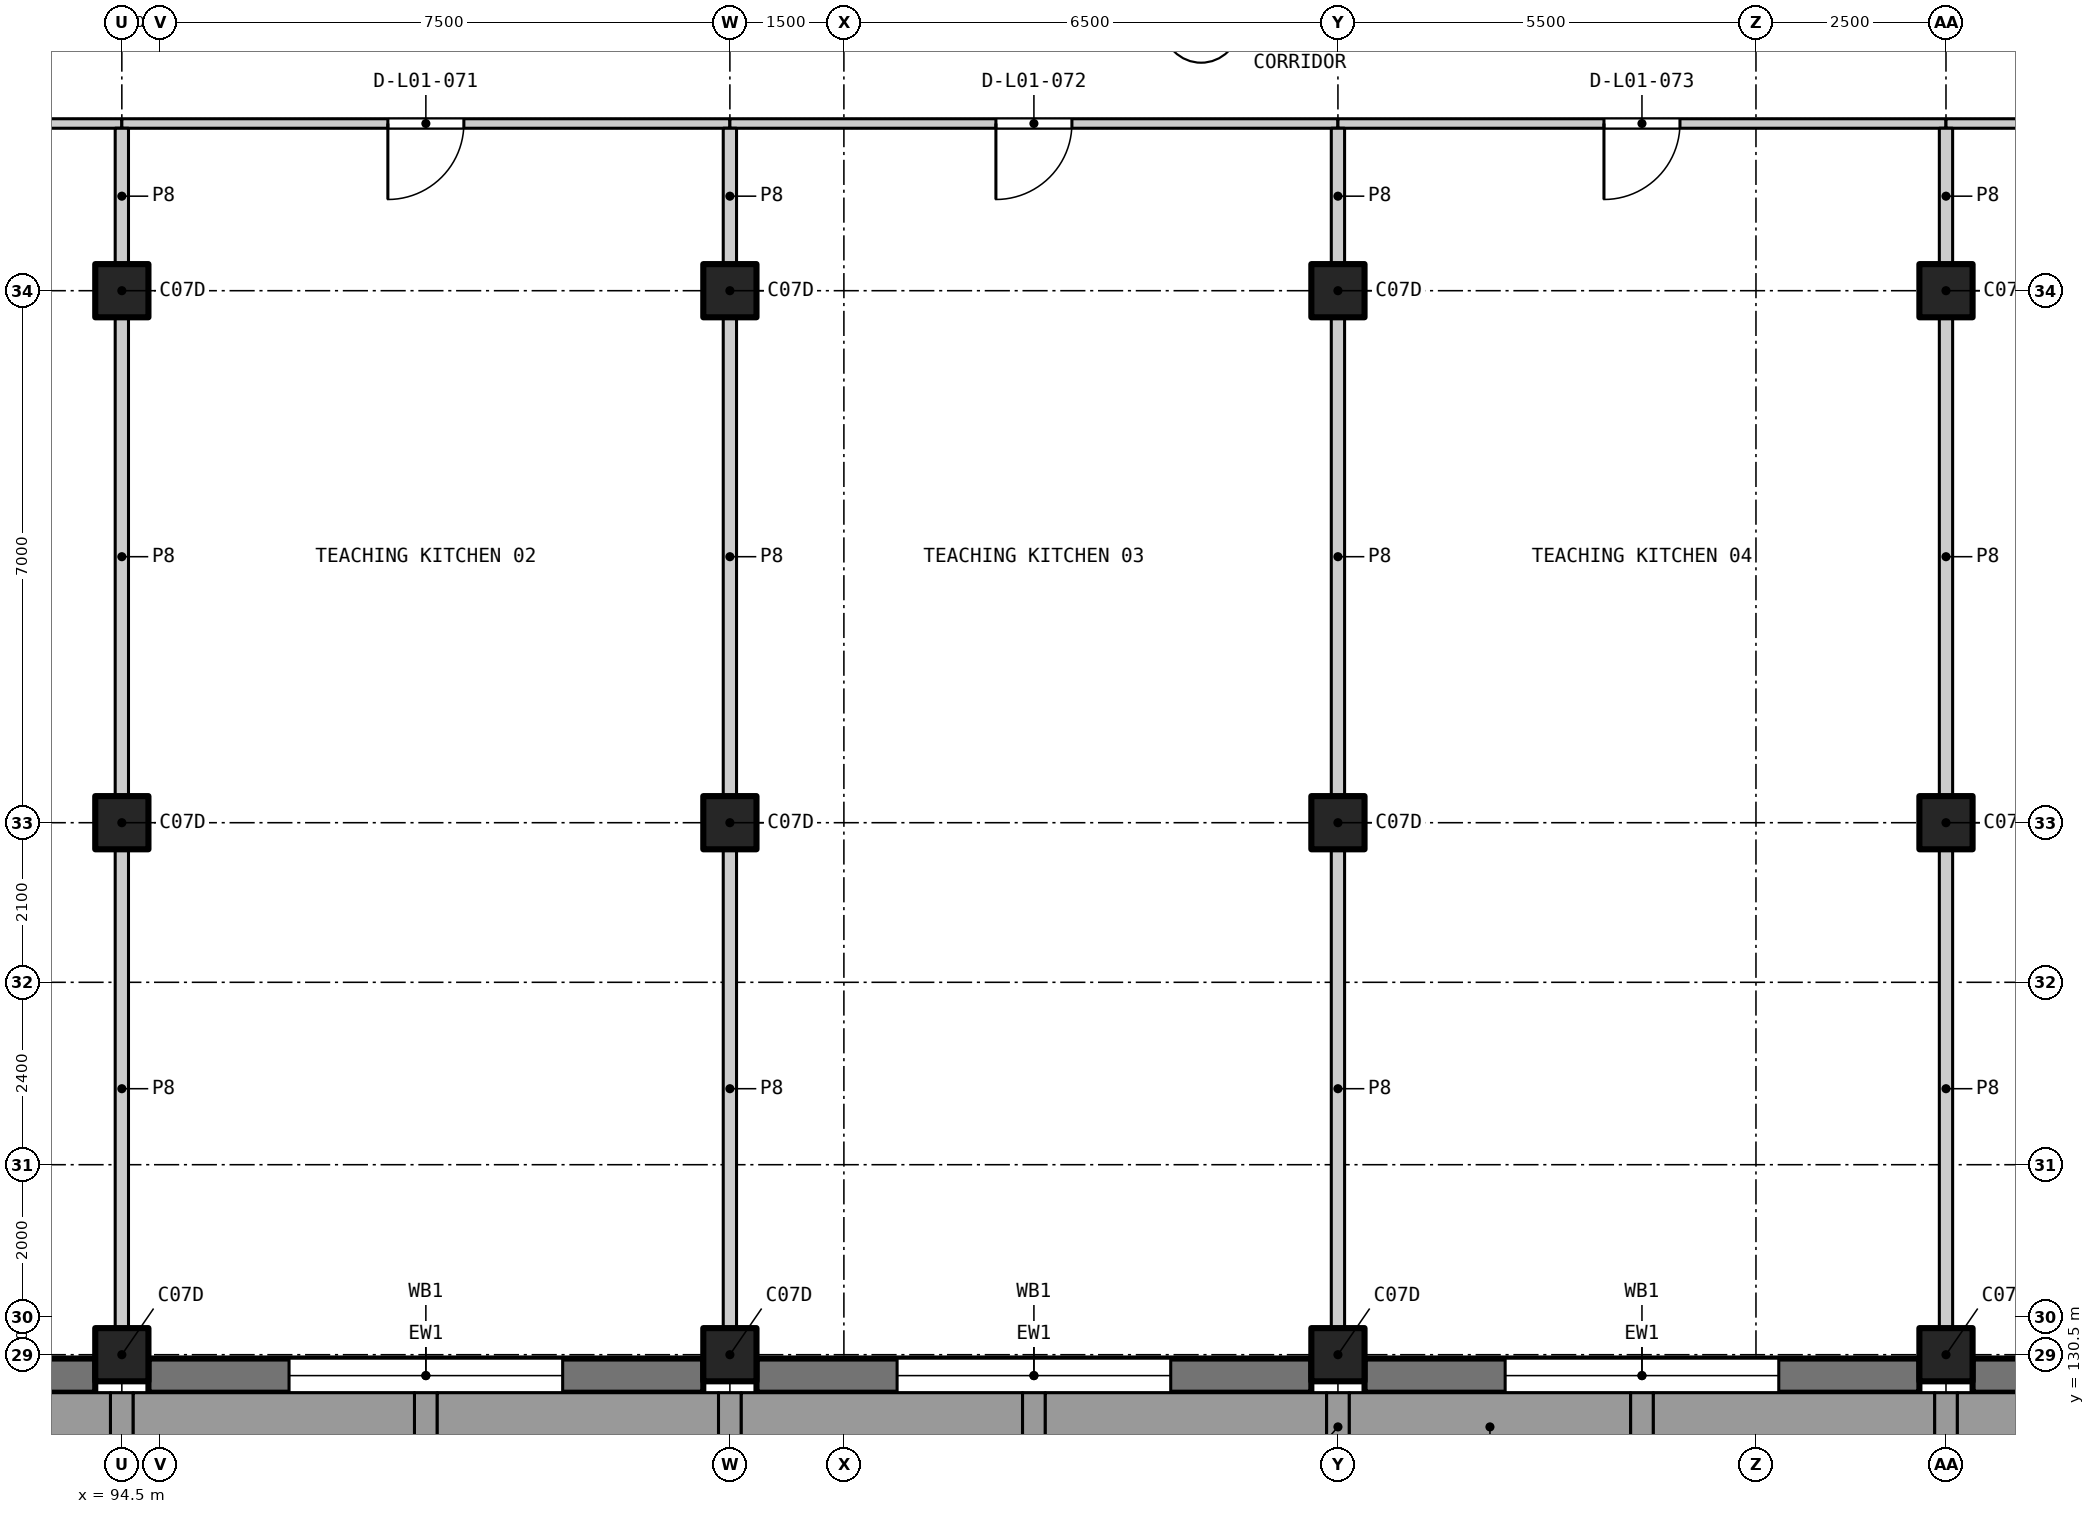
"""IFC4 building model, lengths in metres.
Left out: names, types, materials, properties, quantities, classifications, styles, units other than length and angle.
Written with IfcOpenShell. Run it as: python <this file> out.ifc"""

import sys

from ifc_helpers import new_model, si_unit, direction, frame, frame_2d, origin, origin_2d, place, context, subcontext, project, spatial, rectangle, extrude, element, fill, save


model = new_model("IFC4")
c1 = context("Model", 3, precision=1e-05, world=origin(), true_north=direction((0.0, 1.0)))
c2 = subcontext(c1, "Body", "Model", "MODEL_VIEW")
j1 = project(units=[si_unit("LENGTHUNIT", "METRE"), si_unit("PLANEANGLEUNIT", "RADIAN")], contexts=[c1])
p1 = place(None, origin())
s1 = spatial("IfcSite", under=j1, at=p1, CompositionType="ELEMENT")
p2 = place(p1, origin())
s2 = spatial("IfcBuilding", under=s1, at=p2, CompositionType="ELEMENT")
p3 = place(p2, frame((0.0, 0.0, 6.0)))
s3 = spatial("IfcBuildingStorey", under=s2, at=p3, CompositionType="ELEMENT", Elevation=6.0)
for number, where, z_axis, x_axis in (
    (1, (94.5, 130.5, 0.0), (0.0, 0.0, 1.0), (1.0, 0.0, 0.0)),
    (2, (94.5, 137.5, 0.0), (0.0, 0.0, 1.0), (1.0, 0.0, 0.0)),
    (3, (94.5, 144.5, 0.0), (0.0, 0.0, 1.0), (1.0, 0.0, 0.0)),
    (4, (102.5, 130.5, 0.0), (0.0, 0.0, 1.0), (1.0, 0.0, 0.0)),
    (5, (102.5, 137.5, 0.0), (0.0, 0.0, 1.0), (1.0, 0.0, 0.0)),
    (6, (102.5, 144.5, 0.0), (0.0, 0.0, 1.0), (1.0, 0.0, 0.0)),
    (7, (110.5, 130.5, 0.0), (0.0, 0.0, 1.0), (1.0, 0.0, 0.0)),
    (8, (110.5, 137.5, 0.0), (0.0, 0.0, 1.0), (1.0, 0.0, 0.0)),
    (9, (110.5, 144.5, 0.0), (0.0, 0.0, 1.0), (1.0, 0.0, 0.0)),
    (10, (118.5, 130.5, 0.0), (0.0, 0.0, 1.0), (1.0, 0.0, 0.0)),
    (11, (118.5, 137.5, 0.0), (0.0, 0.0, 1.0), (1.0, 0.0, 0.0)),
    (12, (118.5, 144.5, 0.0), (0.0, 0.0, 1.0), (1.0, 0.0, 0.0)),
):
    element("IfcColumn", number, at=place(p3, frame(where, z_axis=z_axis, x_axis=x_axis)), inside=s3, PredefinedType="COLUMN", context=c2, shape_type="SweptSolid", body=[
        extrude(rectangle(XDim=0.7, YDim=0.7, at=origin_2d()), origin(), (0.0, 0.0, 1.0), 4.2),
    ])
p4 = place(p3, frame((94.15, 130.225, 0.0), z_axis=(0.0, 0.0, 1.0), x_axis=(-1.0, 0.0, 0.0)))
e13 = element("IfcWall", 13, at=p4, inside=s3, PredefinedType="SOLIDWALL", context=c2, shape_type="SweptSolid", body=[
    extrude(rectangle(XDim=7.3, YDim=0.45, at=frame_2d((3.65, 0.0))), origin(), (0.0, 0.0, 1.0), 3.1),
])
p5 = place(p4, frame((1.85, 0.0, 0.9)))
e14 = element("IfcOpeningElement", 14, at=p5, cuts=e13, PredefinedType="OPENING", context=c2, shape_type="SweptSolid", body=[
    extrude(rectangle(XDim=3.6, YDim=1.6, at=frame_2d((1.8, 0.8))), frame((0.0, 0.235, 0.0), z_axis=(0.0, -1.0, 0.0), x_axis=(1.0, 0.0, 0.0)), (0.0, 0.0, 1.0), 0.47),
])
p6 = place(p3, frame((102.15, 130.225, 0.0), z_axis=(0.0, 0.0, 1.0), x_axis=(-1.0, 0.0, 0.0)))
e15 = element("IfcWall", 15, at=p6, inside=s3, PredefinedType="SOLIDWALL", context=c2, shape_type="SweptSolid", body=[
    extrude(rectangle(XDim=7.3, YDim=0.45, at=frame_2d((3.65, 0.0))), origin(), (0.0, 0.0, 1.0), 3.1),
])
p7 = place(p6, frame((1.85, 0.0, 0.9)))
e16 = element("IfcOpeningElement", 16, at=p7, cuts=e15, PredefinedType="OPENING", context=c2, shape_type="SweptSolid", body=[
    extrude(rectangle(XDim=3.6, YDim=1.6, at=frame_2d((1.8, 0.8))), frame((0.0, 0.235, 0.0), z_axis=(0.0, -1.0, 0.0), x_axis=(1.0, 0.0, 0.0)), (0.0, 0.0, 1.0), 0.47),
])
p8 = place(p3, frame((110.15, 130.225, 0.0), z_axis=(0.0, 0.0, 1.0), x_axis=(-1.0, 0.0, 0.0)))
e17 = element("IfcWall", 17, at=p8, inside=s3, PredefinedType="SOLIDWALL", context=c2, shape_type="SweptSolid", body=[
    extrude(rectangle(XDim=7.3, YDim=0.45, at=frame_2d((3.65, 0.0))), origin(), (0.0, 0.0, 1.0), 3.1),
])
p9 = place(p8, frame((1.85, 0.0, 0.9)))
e18 = element("IfcOpeningElement", 18, at=p9, cuts=e17, PredefinedType="OPENING", context=c2, shape_type="SweptSolid", body=[
    extrude(rectangle(XDim=3.6, YDim=1.6, at=frame_2d((1.8, 0.8))), frame((0.0, 0.235, 0.0), z_axis=(0.0, -1.0, 0.0), x_axis=(1.0, 0.0, 0.0)), (0.0, 0.0, 1.0), 0.47),
])
p10 = place(p3, frame((118.15, 130.225, 0.0), z_axis=(0.0, 0.0, 1.0), x_axis=(-1.0, 0.0, 0.0)))
e19 = element("IfcWall", 19, at=p10, inside=s3, PredefinedType="SOLIDWALL", context=c2, shape_type="SweptSolid", body=[
    extrude(rectangle(XDim=7.3, YDim=0.45, at=frame_2d((3.65, 0.0))), origin(), (0.0, 0.0, 1.0), 3.1),
])
p11 = place(p10, frame((1.85, 0.0, 0.9)))
e20 = element("IfcOpeningElement", 20, at=p11, cuts=e19, PredefinedType="OPENING", context=c2, shape_type="SweptSolid", body=[
    extrude(rectangle(XDim=3.6, YDim=1.6, at=frame_2d((1.8, 0.8))), frame((0.0, 0.235, 0.0), z_axis=(0.0, -1.0, 0.0), x_axis=(1.0, 0.0, 0.0)), (0.0, 0.0, 1.0), 0.47),
])
p12 = place(p3, frame((126.15, 130.225, 0.0), z_axis=(0.0, 0.0, 1.0), x_axis=(-1.0, 0.0, 0.0)))
e21 = element("IfcWall", 21, at=p12, inside=s3, PredefinedType="SOLIDWALL", context=c2, shape_type="SweptSolid", body=[
    extrude(rectangle(XDim=7.3, YDim=0.45, at=frame_2d((3.65, 0.0))), origin(), (0.0, 0.0, 1.0), 3.1),
])
p13 = place(p12, frame((1.85, 0.0, 0.9)))
e22 = element("IfcOpeningElement", 22, at=p13, cuts=e21, PredefinedType="OPENING", context=c2, shape_type="SweptSolid", body=[
    extrude(rectangle(XDim=3.6, YDim=1.6, at=frame_2d((1.8, 0.8))), frame((0.0, 0.235, 0.0), z_axis=(0.0, -1.0, 0.0), x_axis=(1.0, 0.0, 0.0)), (0.0, 0.0, 1.0), 0.47),
])
p14 = place(p3, frame((86.45, 146.7, 0.0), z_axis=(0.0, 0.0, 1.0), x_axis=(1.0, 0.0, 0.0)))
e23 = element("IfcWall", 23, at=p14, inside=s3, PredefinedType="PARTITIONING", context=c2, shape_type="SweptSolid", body=[
    extrude(rectangle(XDim=8.05, YDim=0.125, at=frame_2d((4.025, 0.0))), origin(), (0.0, 0.0, 1.0), 3.9),
])
p15 = place(p14, frame((3.55, 0.0, 0.0)))
e24 = element("IfcOpeningElement", 24, at=p15, cuts=e23, PredefinedType="OPENING", context=c2, shape_type="SweptSolid", body=[
    extrude(rectangle(XDim=1.0, YDim=2.1, at=frame_2d((0.5, 1.05))), frame((0.0, 0.073, 0.0), z_axis=(0.0, -1.0, 0.0), x_axis=(1.0, 0.0, 0.0)), (0.0, 0.0, 1.0), 0.145),
])
p16 = place(p3, frame((94.5, 146.7, 0.0), z_axis=(0.0, 0.0, 1.0), x_axis=(1.0, 0.0, 0.0)))
e25 = element("IfcWall", 25, at=p16, inside=s3, PredefinedType="PARTITIONING", context=c2, shape_type="SweptSolid", body=[
    extrude(rectangle(XDim=8.0, YDim=0.125, at=frame_2d((4.0, 0.0))), origin(), (0.0, 0.0, 1.0), 3.9),
])
p17 = place(p16, frame((3.5, 0.0, 0.0)))
e26 = element("IfcOpeningElement", 26, at=p17, cuts=e25, PredefinedType="OPENING", context=c2, shape_type="SweptSolid", body=[
    extrude(rectangle(XDim=1.0, YDim=2.1, at=frame_2d((0.5, 1.05))), frame((0.0, 0.073, 0.0), z_axis=(0.0, -1.0, 0.0), x_axis=(1.0, 0.0, 0.0)), (0.0, 0.0, 1.0), 0.145),
])
p18 = place(p3, frame((102.5, 146.7, 0.0), z_axis=(0.0, 0.0, 1.0), x_axis=(1.0, 0.0, 0.0)))
e27 = element("IfcWall", 27, at=p18, inside=s3, PredefinedType="PARTITIONING", context=c2, shape_type="SweptSolid", body=[
    extrude(rectangle(XDim=8.0, YDim=0.125, at=frame_2d((4.0, 0.0))), origin(), (0.0, 0.0, 1.0), 3.9),
])
p19 = place(p18, frame((3.5, 0.0, 0.0)))
e28 = element("IfcOpeningElement", 28, at=p19, cuts=e27, PredefinedType="OPENING", context=c2, shape_type="SweptSolid", body=[
    extrude(rectangle(XDim=1.0, YDim=2.1, at=frame_2d((0.5, 1.05))), frame((0.0, 0.073, 0.0), z_axis=(0.0, -1.0, 0.0), x_axis=(1.0, 0.0, 0.0)), (0.0, 0.0, 1.0), 0.145),
])
p20 = place(p3, frame((110.5, 146.7, 0.0), z_axis=(0.0, 0.0, 1.0), x_axis=(1.0, 0.0, 0.0)))
e29 = element("IfcWall", 29, at=p20, inside=s3, PredefinedType="PARTITIONING", context=c2, shape_type="SweptSolid", body=[
    extrude(rectangle(XDim=8.0, YDim=0.125, at=frame_2d((4.0, 0.0))), origin(), (0.0, 0.0, 1.0), 3.9),
])
p21 = place(p20, frame((3.5, 0.0, 0.0)))
e30 = element("IfcOpeningElement", 30, at=p21, cuts=e29, PredefinedType="OPENING", context=c2, shape_type="SweptSolid", body=[
    extrude(rectangle(XDim=1.0, YDim=2.1, at=frame_2d((0.5, 1.05))), frame((0.0, 0.073, 0.0), z_axis=(0.0, -1.0, 0.0), x_axis=(1.0, 0.0, 0.0)), (0.0, 0.0, 1.0), 0.145),
])
p22 = place(p3, frame((118.5, 146.7, 0.0), z_axis=(0.0, 0.0, 1.0), x_axis=(1.0, 0.0, 0.0)))
e31 = element("IfcWall", 31, at=p22, inside=s3, PredefinedType="PARTITIONING", context=c2, shape_type="SweptSolid", body=[
    extrude(rectangle(XDim=8.0, YDim=0.125, at=frame_2d((4.0, 0.0))), origin(), (0.0, 0.0, 1.0), 3.9),
])
p23 = place(p22, frame((3.5, 0.0, 0.0)))
e32 = element("IfcOpeningElement", 32, at=p23, cuts=e31, PredefinedType="OPENING", context=c2, shape_type="SweptSolid", body=[
    extrude(rectangle(XDim=1.0, YDim=2.1, at=frame_2d((0.5, 1.05))), frame((0.0, 0.073, 0.0), z_axis=(0.0, -1.0, 0.0), x_axis=(1.0, 0.0, 0.0)), (0.0, 0.0, 1.0), 0.145),
])
for number, where, z_axis, x_axis in (
    (33, (94.5, 130.85, 0.0), (0.0, 0.0, 1.0), (0.0, 1.0, 0.0)),
    (34, (94.5, 137.85, 0.0), (0.0, 0.0, 1.0), (0.0, 1.0, 0.0)),
):
    element("IfcWall", number, at=place(p3, frame(where, z_axis=z_axis, x_axis=x_axis)), inside=s3, PredefinedType="PARTITIONING", context=c2, shape_type="SweptSolid", body=[
        extrude(rectangle(XDim=6.3, YDim=0.175, at=frame_2d((3.15, 0.0))), origin(), (0.0, 0.0, 1.0), 3.2),
    ])
p24 = place(p3, frame((94.5, 144.85, 0.0), z_axis=(0.0, 0.0, 1.0), x_axis=(0.0, 1.0, 0.0)))
e35 = element("IfcWall", 35, at=p24, inside=s3, PredefinedType="PARTITIONING", context=c2, shape_type="SweptSolid", body=[
    extrude(rectangle(XDim=1.787, YDim=0.175, at=frame_2d((0.894, 0.0))), origin(), (0.0, 0.0, 1.0), 3.2),
])
for number, where, z_axis, x_axis in (
    (36, (102.5, 130.85, 0.0), (0.0, 0.0, 1.0), (0.0, 1.0, 0.0)),
    (37, (102.5, 137.85, 0.0), (0.0, 0.0, 1.0), (0.0, 1.0, 0.0)),
):
    element("IfcWall", number, at=place(p3, frame(where, z_axis=z_axis, x_axis=x_axis)), inside=s3, PredefinedType="PARTITIONING", context=c2, shape_type="SweptSolid", body=[
        extrude(rectangle(XDim=6.3, YDim=0.175, at=frame_2d((3.15, 0.0))), origin(), (0.0, 0.0, 1.0), 3.2),
    ])
p25 = place(p3, frame((102.5, 144.85, 0.0), z_axis=(0.0, 0.0, 1.0), x_axis=(0.0, 1.0, 0.0)))
e38 = element("IfcWall", 38, at=p25, inside=s3, PredefinedType="PARTITIONING", context=c2, shape_type="SweptSolid", body=[
    extrude(rectangle(XDim=1.787, YDim=0.175, at=frame_2d((0.894, 0.0))), origin(), (0.0, 0.0, 1.0), 3.2),
])
for number, where, z_axis, x_axis in (
    (39, (110.5, 130.85, 0.0), (0.0, 0.0, 1.0), (0.0, 1.0, 0.0)),
    (40, (110.5, 137.85, 0.0), (0.0, 0.0, 1.0), (0.0, 1.0, 0.0)),
):
    element("IfcWall", number, at=place(p3, frame(where, z_axis=z_axis, x_axis=x_axis)), inside=s3, PredefinedType="PARTITIONING", context=c2, shape_type="SweptSolid", body=[
        extrude(rectangle(XDim=6.3, YDim=0.175, at=frame_2d((3.15, 0.0))), origin(), (0.0, 0.0, 1.0), 3.2),
    ])
p26 = place(p3, frame((110.5, 144.85, 0.0), z_axis=(0.0, 0.0, 1.0), x_axis=(0.0, 1.0, 0.0)))
e41 = element("IfcWall", 41, at=p26, inside=s3, PredefinedType="PARTITIONING", context=c2, shape_type="SweptSolid", body=[
    extrude(rectangle(XDim=1.787, YDim=0.175, at=frame_2d((0.894, 0.0))), origin(), (0.0, 0.0, 1.0), 3.2),
])
for number, where, z_axis, x_axis in (
    (42, (118.5, 130.85, 0.0), (0.0, 0.0, 1.0), (0.0, 1.0, 0.0)),
    (43, (118.5, 137.85, 0.0), (0.0, 0.0, 1.0), (0.0, 1.0, 0.0)),
):
    element("IfcWall", number, at=place(p3, frame(where, z_axis=z_axis, x_axis=x_axis)), inside=s3, PredefinedType="PARTITIONING", context=c2, shape_type="SweptSolid", body=[
        extrude(rectangle(XDim=6.3, YDim=0.175, at=frame_2d((3.15, 0.0))), origin(), (0.0, 0.0, 1.0), 3.2),
    ])
p27 = place(p3, frame((118.5, 144.85, 0.0), z_axis=(0.0, 0.0, 1.0), x_axis=(0.0, 1.0, 0.0)))
e44 = element("IfcWall", 44, at=p27, inside=s3, PredefinedType="PARTITIONING", context=c2, shape_type="SweptSolid", body=[
    extrude(rectangle(XDim=1.787, YDim=0.175, at=frame_2d((0.894, 0.0))), origin(), (0.0, 0.0, 1.0), 3.2),
])
p28 = place(p7, origin())
e45 = element("IfcWindow", 45, at=p28, inside=s3, PartitioningType="SINGLE_PANEL", PredefinedType="WINDOW", context=c2, shape_type="SweptSolid", body=[
    extrude(rectangle(XDim=3.6, YDim=1.6, at=frame_2d((1.8, 0.8))), frame((0.0, -0.125, 0.0), z_axis=(0.0, -1.0, 0.0), x_axis=(1.0, 0.0, 0.0)), (0.0, 0.0, 1.0), 0.06),
])
fill(e16, e45)
p29 = place(p9, origin())
e46 = element("IfcWindow", 46, at=p29, inside=s3, PartitioningType="SINGLE_PANEL", PredefinedType="WINDOW", context=c2, shape_type="SweptSolid", body=[
    extrude(rectangle(XDim=3.6, YDim=1.6, at=frame_2d((1.8, 0.8))), frame((0.0, -0.125, 0.0), z_axis=(0.0, -1.0, 0.0), x_axis=(1.0, 0.0, 0.0)), (0.0, 0.0, 1.0), 0.06),
])
fill(e18, e46)
p30 = place(p11, origin())
e47 = element("IfcWindow", 47, at=p30, inside=s3, PartitioningType="SINGLE_PANEL", PredefinedType="WINDOW", context=c2, shape_type="SweptSolid", body=[
    extrude(rectangle(XDim=3.6, YDim=1.6, at=frame_2d((1.8, 0.8))), frame((0.0, -0.125, 0.0), z_axis=(0.0, -1.0, 0.0), x_axis=(1.0, 0.0, 0.0)), (0.0, 0.0, 1.0), 0.06),
])
fill(e20, e47)
p31 = place(p17, frame((1.0, 0.0, 0.0), z_axis=(0.0, 0.0, 1.0), x_axis=(-1.0, 0.0, 0.0)))
e48 = element("IfcDoor", 48, at=p31, inside=s3, OperationType="SINGLE_SWING_RIGHT", PredefinedType="DOOR", context=c2, shape_type="SweptSolid", body=[
    extrude(rectangle(XDim=1.0, YDim=2.1, at=frame_2d((0.5, 1.05))), frame((0.0, 0.025, 0.0), z_axis=(0.0, -1.0, 0.0), x_axis=(1.0, 0.0, 0.0)), (0.0, 0.0, 1.0), 0.05),
])
fill(e26, e48)
p32 = place(p19, frame((1.0, 0.0, 0.0), z_axis=(0.0, 0.0, 1.0), x_axis=(-1.0, 0.0, 0.0)))
e49 = element("IfcDoor", 49, at=p32, inside=s3, OperationType="SINGLE_SWING_RIGHT", PredefinedType="DOOR", context=c2, shape_type="SweptSolid", body=[
    extrude(rectangle(XDim=1.0, YDim=2.1, at=frame_2d((0.5, 1.05))), frame((0.0, 0.025, 0.0), z_axis=(0.0, -1.0, 0.0), x_axis=(1.0, 0.0, 0.0)), (0.0, 0.0, 1.0), 0.05),
])
fill(e28, e49)
p33 = place(p21, frame((1.0, 0.0, 0.0), z_axis=(0.0, 0.0, 1.0), x_axis=(-1.0, 0.0, 0.0)))
e50 = element("IfcDoor", 50, at=p33, inside=s3, OperationType="SINGLE_SWING_RIGHT", PredefinedType="DOOR", context=c2, shape_type="SweptSolid", body=[
    extrude(rectangle(XDim=1.0, YDim=2.1, at=frame_2d((0.5, 1.05))), frame((0.0, 0.025, 0.0), z_axis=(0.0, -1.0, 0.0), x_axis=(1.0, 0.0, 0.0)), (0.0, 0.0, 1.0), 0.05),
])
fill(e30, e50)
save(model, sys.argv[1])
